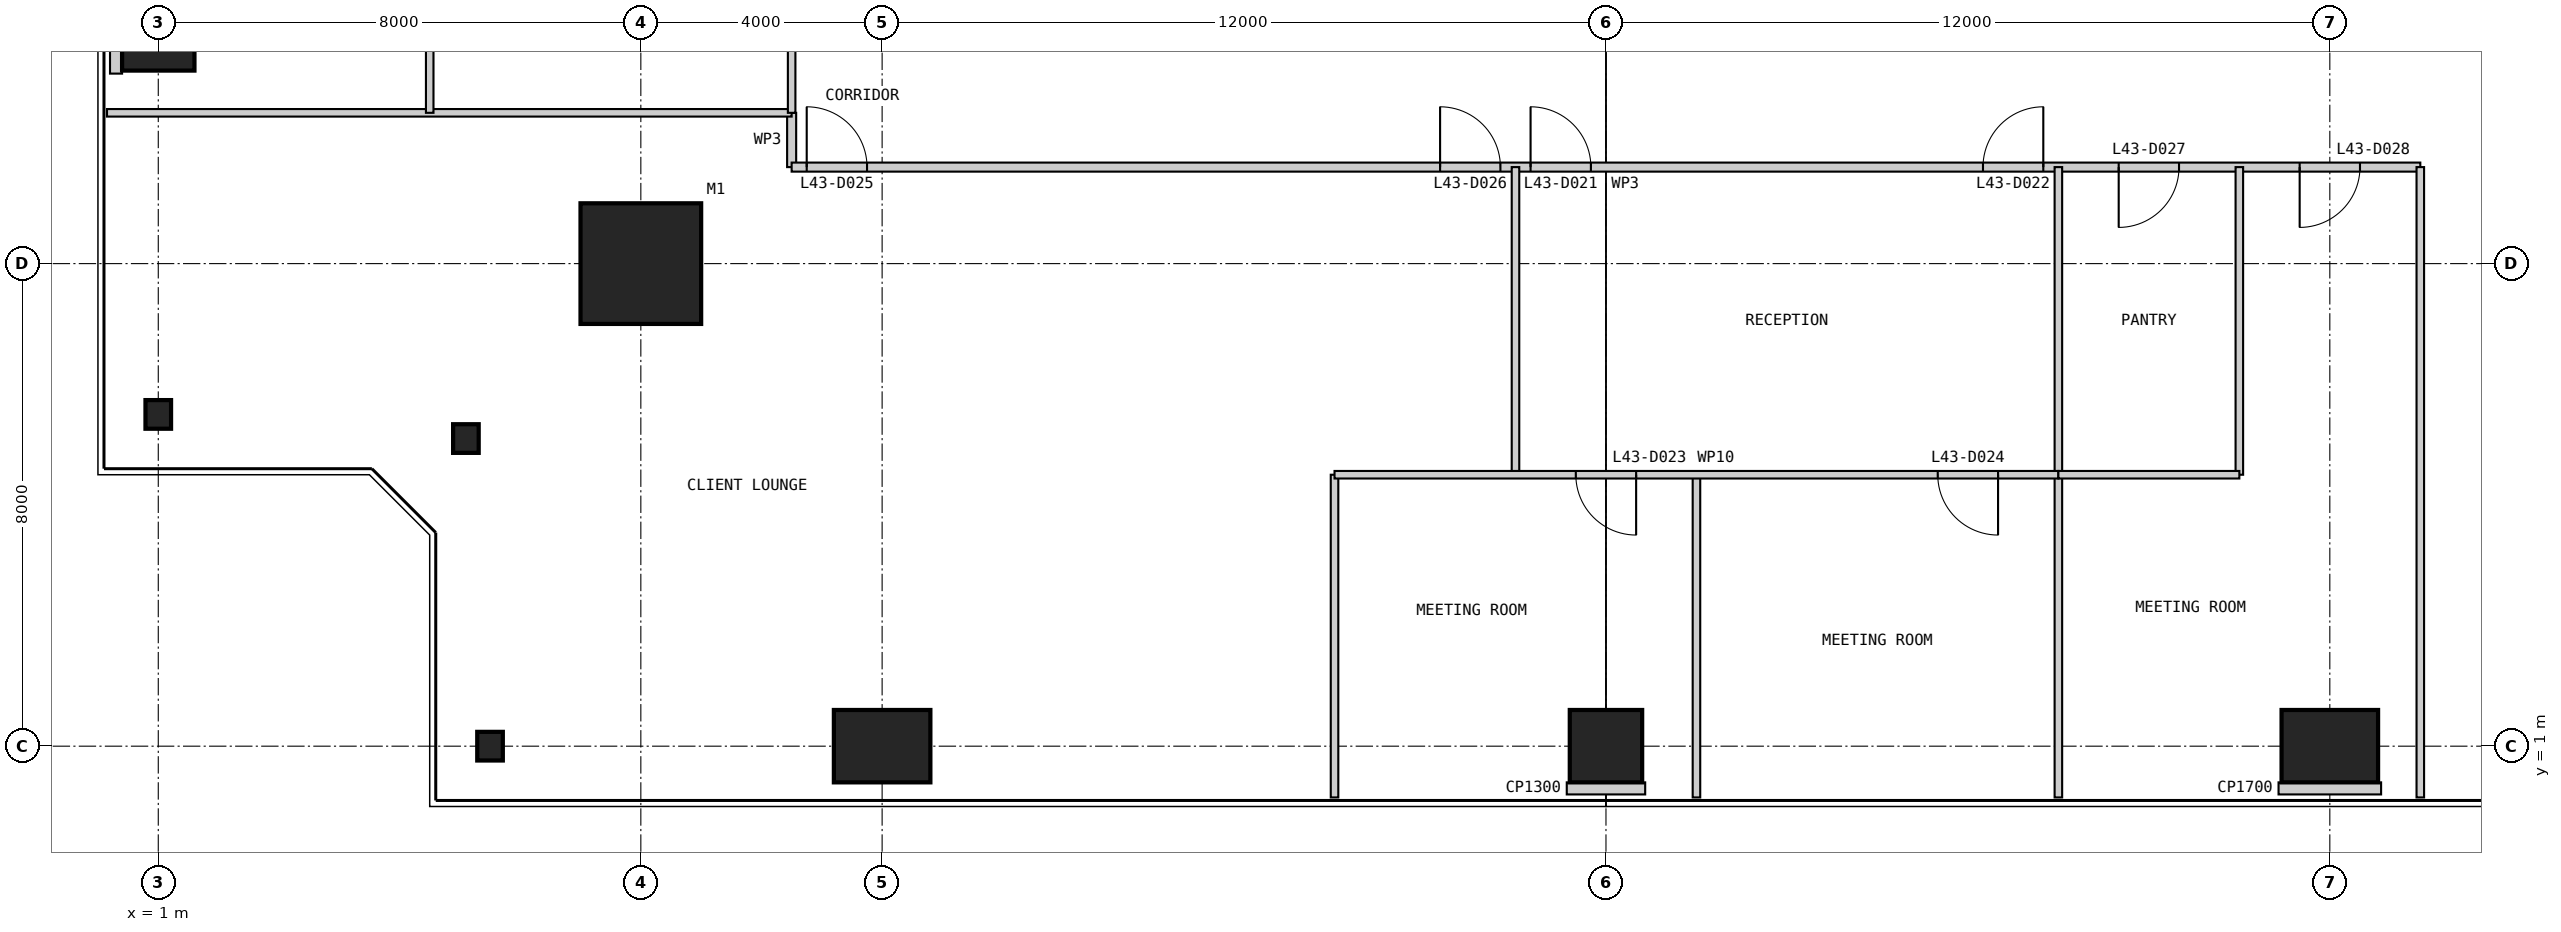
"""IFC4 building model, lengths in metres.
Left out: names, types, materials, properties, quantities, classifications, styles, units other than length and angle.
Written with IfcOpenShell. Run it as: python <this file> out.ifc"""

import sys

from ifc_helpers import new_model, si_unit, direction, frame, frame_2d, origin, origin_2d, place, context, subcontext, project, spatial, rectangle, i_section, extrude, element, fill, save


model = new_model("IFC4")
c1 = context("Model", 3, precision=1e-05, world=origin(), true_north=direction((0.0, 1.0)))
c2 = subcontext(c1, "Body", "Model", "MODEL_VIEW")
j1 = project(units=[si_unit("LENGTHUNIT", "METRE"), si_unit("PLANEANGLEUNIT", "RADIAN")], contexts=[c1])
p1 = place(None, origin())
s1 = spatial("IfcSite", under=j1, at=p1, CompositionType="ELEMENT")
p2 = place(p1, origin())
s2 = spatial("IfcBuilding", under=s1, at=p2, CompositionType="ELEMENT")
p3 = place(p2, frame((0.0, 0.0, 185.8)))
s3 = spatial("IfcBuildingStorey", under=s2, at=p3, CompositionType="ELEMENT", Elevation=185.8)
p4 = place(p3, frame((9.0, 9.0, 0.0), z_axis=(0.0, 0.0, 1.0), x_axis=(1.0, 0.0, 0.0)))
e1 = element("IfcColumn", 1, at=p4, inside=s3, PredefinedType="COLUMN", context=c2, shape_type="SweptSolid", body=[
    extrude(rectangle(XDim=2.0, YDim=2.0, at=origin_2d()), origin(), (0.0, 0.0, 1.0), 4.0),
])
p5 = place(p3, frame((6.5, 1.0, 0.0), z_axis=(0.0, 0.0, 1.0), x_axis=(1.0, 0.0, 0.0)))
e2 = element("IfcColumn", 2, at=p5, inside=s3, PredefinedType="COLUMN", context=c2, shape_type="SweptSolid", body=[
    extrude(i_section(OverallWidth=0.424, OverallDepth=0.475, WebThickness=0.048, FlangeThickness=0.077, at=origin_2d()), origin(), (0.0, 0.0, 1.0), 4.0),
])
p6 = place(p3, frame((13.0, 1.0, 0.0), z_axis=(0.0, 0.0, 1.0), x_axis=(1.0, 0.0, 0.0)))
e3 = element("IfcColumn", 3, at=p6, inside=s3, PredefinedType="COLUMN", context=c2, shape_type="SweptSolid", body=[
    extrude(rectangle(XDim=1.6, YDim=1.2, at=origin_2d()), origin(), (0.0, 0.0, 1.0), 4.0),
])
p7 = place(p3, frame((25.0, 1.0, 0.0), z_axis=(0.0, 0.0, 1.0), x_axis=(1.0, 0.0, 0.0)))
e4 = element("IfcColumn", 4, at=p7, inside=s3, PredefinedType="COLUMN", context=c2, shape_type="SweptSolid", body=[
    extrude(rectangle(XDim=1.2, YDim=1.2, at=origin_2d()), origin(), (0.0, 0.0, 1.0), 4.0),
])
p8 = place(p3, frame((37.0, 1.0, 0.0), z_axis=(0.0, 0.0, 1.0), x_axis=(1.0, 0.0, 0.0)))
e5 = element("IfcColumn", 5, at=p8, inside=s3, PredefinedType="COLUMN", context=c2, shape_type="SweptSolid", body=[
    extrude(rectangle(XDim=1.6, YDim=1.2, at=origin_2d()), origin(), (0.0, 0.0, 1.0), 4.0),
])
p9 = place(p3, frame((1.0, 13.0, 0.0), z_axis=(0.0, 0.0, 1.0), x_axis=(1.0, 0.0, 0.0)))
e6 = element("IfcColumn", 6, at=p9, inside=s3, PredefinedType="COLUMN", context=c2, shape_type="SweptSolid", body=[
    extrude(rectangle(XDim=1.2, YDim=1.6, at=origin_2d()), origin(), (0.0, 0.0, 1.0), 4.0),
])
for number, where, z_axis, x_axis in (
    (7, (1.0, 6.5, 0.0), (0.0, 0.0, 1.0), (1.0, 0.0, 0.0)),
    (8, (6.1, 6.1, 0.0), (0.0, 0.0, 1.0), (1.0, 0.0, 0.0)),
):
    element("IfcColumn", number, at=place(p3, frame(where, z_axis=z_axis, x_axis=x_axis)), inside=s3, PredefinedType="COLUMN", context=c2, shape_type="SweptSolid", body=[
        extrude(i_section(OverallWidth=0.424, OverallDepth=0.475, WebThickness=0.048, FlangeThickness=0.077, at=origin_2d()), origin(), (0.0, 0.0, 1.0), 4.0),
    ])
p10 = place(p3, frame((11.5, 11.5, 0.0), z_axis=(0.0, 0.0, 1.0), x_axis=(0.0, -1.0, 0.0)))
e9 = element("IfcWall", 9, at=p10, inside=s3, PredefinedType="PARTITIONING", context=c2, shape_type="SweptSolid", body=[
    extrude(rectangle(XDim=0.9, YDim=0.15, at=frame_2d((0.45, 0.0))), origin(), (0.0, 0.0, 1.0), 3.85),
])
p11 = place(p3, frame((11.5, 10.6, 0.0), z_axis=(0.0, 0.0, 1.0), x_axis=(1.0, 0.0, 0.0)))
e10 = element("IfcWall", 10, at=p11, inside=s3, PredefinedType="PARTITIONING", context=c2, shape_type="SweptSolid", body=[
    extrude(rectangle(XDim=27.0, YDim=0.15, at=frame_2d((13.5, 0.0))), origin(), (0.0, 0.0, 1.0), 3.85),
])
p12 = place(p11, frame((12.25, 0.0, 0.0)))
e11 = element("IfcOpeningElement", 11, at=p12, cuts=e10, PredefinedType="OPENING", context=c2, shape_type="SweptSolid", body=[
    extrude(rectangle(XDim=1.0, YDim=2.2, at=frame_2d((0.5, 1.1))), frame((0.0, 0.085, 0.0), z_axis=(0.0, -1.0, 0.0), x_axis=(1.0, 0.0, 0.0)), (0.0, 0.0, 1.0), 0.17),
])
p13 = place(p11, frame((19.75, 0.0, 0.0)))
e12 = element("IfcOpeningElement", 12, at=p13, cuts=e10, PredefinedType="OPENING", context=c2, shape_type="SweptSolid", body=[
    extrude(rectangle(XDim=1.0, YDim=2.2, at=frame_2d((0.5, 1.1))), frame((0.0, 0.085, 0.0), z_axis=(0.0, -1.0, 0.0), x_axis=(1.0, 0.0, 0.0)), (0.0, 0.0, 1.0), 0.17),
])
p14 = place(p11, frame((0.25, 0.0, 0.0)))
e13 = element("IfcOpeningElement", 13, at=p14, cuts=e10, PredefinedType="OPENING", context=c2, shape_type="SweptSolid", body=[
    extrude(rectangle(XDim=1.0, YDim=2.2, at=frame_2d((0.5, 1.1))), frame((0.0, 0.085, 0.0), z_axis=(0.0, -1.0, 0.0), x_axis=(1.0, 0.0, 0.0)), (0.0, 0.0, 1.0), 0.17),
])
p15 = place(p11, frame((10.75, 0.0, 0.0)))
e14 = element("IfcOpeningElement", 14, at=p15, cuts=e10, PredefinedType="OPENING", context=c2, shape_type="SweptSolid", body=[
    extrude(rectangle(XDim=1.0, YDim=2.2, at=frame_2d((0.5, 1.1))), frame((0.0, 0.085, 0.0), z_axis=(0.0, -1.0, 0.0), x_axis=(1.0, 0.0, 0.0)), (0.0, 0.0, 1.0), 0.17),
])
p16 = place(p11, frame((22.0, 0.0, 0.0)))
e15 = element("IfcOpeningElement", 15, at=p16, cuts=e10, PredefinedType="OPENING", context=c2, shape_type="SweptSolid", body=[
    extrude(rectangle(XDim=1.0, YDim=2.2, at=frame_2d((0.5, 1.1))), frame((0.0, 0.085, 0.0), z_axis=(0.0, -1.0, 0.0), x_axis=(1.0, 0.0, 0.0)), (0.0, 0.0, 1.0), 0.17),
])
p17 = place(p11, frame((25.0, 0.0, 0.0)))
e16 = element("IfcOpeningElement", 16, at=p17, cuts=e10, PredefinedType="OPENING", context=c2, shape_type="SweptSolid", body=[
    extrude(rectangle(XDim=1.0, YDim=2.2, at=frame_2d((0.5, 1.1))), frame((0.0, 0.085, 0.0), z_axis=(0.0, -1.0, 0.0), x_axis=(1.0, 0.0, 0.0)), (0.0, 0.0, 1.0), 0.17),
])
p18 = place(p3, frame((0.15, 11.5, 0.0), z_axis=(0.0, 0.0, 1.0), x_axis=(1.0, 0.0, 0.0)))
e17 = element("IfcWall", 17, at=p18, inside=s3, PredefinedType="PARTITIONING", context=c2, shape_type="SweptSolid", body=[
    extrude(rectangle(XDim=11.35, YDim=0.125, at=frame_2d((5.675, 0.0))), origin(), (0.0, 0.0, 1.0), 3.85),
])
p19 = place(p3, frame((20.5, 0.15, 0.0), z_axis=(0.0, 0.0, 1.0), x_axis=(0.0, 1.0, 0.0)))
e18 = element("IfcWall", 18, at=p19, inside=s3, PredefinedType="PARTITIONING", context=c2, shape_type="SweptSolid", body=[
    extrude(rectangle(XDim=5.35, YDim=0.125, at=frame_2d((2.675, 0.0))), origin(), (0.0, 0.0, 1.0), 3.85),
])
p20 = place(p3, frame((23.5, 5.5, 0.0), z_axis=(0.0, 0.0, 1.0), x_axis=(0.0, 1.0, 0.0)))
e19 = element("IfcWall", 19, at=p20, inside=s3, PredefinedType="PARTITIONING", context=c2, shape_type="SweptSolid", body=[
    extrude(rectangle(XDim=5.1, YDim=0.125, at=frame_2d((2.55, 0.0))), origin(), (0.0, 0.0, 1.0), 3.85),
])
p21 = place(p3, frame((26.5, 0.15, 0.0), z_axis=(0.0, 0.0, 1.0), x_axis=(0.0, 1.0, 0.0)))
e20 = element("IfcWall", 20, at=p21, inside=s3, PredefinedType="PARTITIONING", context=c2, shape_type="SweptSolid", body=[
    extrude(rectangle(XDim=5.35, YDim=0.125, at=frame_2d((2.675, 0.0))), origin(), (0.0, 0.0, 1.0), 3.85),
])
p22 = place(p3, frame((32.5, 0.15, 0.0), z_axis=(0.0, 0.0, 1.0), x_axis=(0.0, 1.0, 0.0)))
e21 = element("IfcWall", 21, at=p22, inside=s3, PredefinedType="PARTITIONING", context=c2, shape_type="SweptSolid", body=[
    extrude(rectangle(XDim=10.45, YDim=0.125, at=frame_2d((5.225, 0.0))), origin(), (0.0, 0.0, 1.0), 3.85),
])
p23 = place(p3, frame((35.5, 5.5, 0.0), z_axis=(0.0, 0.0, 1.0), x_axis=(0.0, 1.0, 0.0)))
e22 = element("IfcWall", 22, at=p23, inside=s3, PredefinedType="PARTITIONING", context=c2, shape_type="SweptSolid", body=[
    extrude(rectangle(XDim=5.1, YDim=0.125, at=frame_2d((2.55, 0.0))), origin(), (0.0, 0.0, 1.0), 3.85),
])
p24 = place(p3, frame((20.5, 5.5, 0.0), z_axis=(0.0, 0.0, 1.0), x_axis=(1.0, 0.0, 0.0)))
e23 = element("IfcWall", 23, at=p24, inside=s3, PredefinedType="PARTITIONING", context=c2, shape_type="SweptSolid", body=[
    extrude(rectangle(XDim=12.0, YDim=0.125, at=frame_2d((6.0, 0.0))), origin(), (0.0, 0.0, 1.0), 3.85),
])
p25 = place(p24, frame((4.0, 0.0, 0.0)))
e24 = element("IfcOpeningElement", 24, at=p25, cuts=e23, PredefinedType="OPENING", context=c2, shape_type="SweptSolid", body=[
    extrude(rectangle(XDim=1.0, YDim=2.2, at=frame_2d((0.5, 1.1))), frame((0.0, 0.073, 0.0), z_axis=(0.0, -1.0, 0.0), x_axis=(1.0, 0.0, 0.0)), (0.0, 0.0, 1.0), 0.145),
])
p26 = place(p24, frame((10.0, 0.0, 0.0)))
e25 = element("IfcOpeningElement", 25, at=p26, cuts=e23, PredefinedType="OPENING", context=c2, shape_type="SweptSolid", body=[
    extrude(rectangle(XDim=1.0, YDim=2.2, at=frame_2d((0.5, 1.1))), frame((0.0, 0.073, 0.0), z_axis=(0.0, -1.0, 0.0), x_axis=(1.0, 0.0, 0.0)), (0.0, 0.0, 1.0), 0.145),
])
p27 = place(p3, frame((32.5, 5.5, 0.0), z_axis=(0.0, 0.0, 1.0), x_axis=(1.0, 0.0, 0.0)))
e26 = element("IfcWall", 26, at=p27, inside=s3, PredefinedType="PARTITIONING", context=c2, shape_type="SweptSolid", body=[
    extrude(rectangle(XDim=3.0, YDim=0.125, at=frame_2d((1.5, 0.0))), origin(), (0.0, 0.0, 1.0), 3.85),
])
p28 = place(p3, frame((38.5, 0.15, 0.0), z_axis=(0.0, 0.0, 1.0), x_axis=(0.0, 1.0, 0.0)))
e27 = element("IfcWall", 27, at=p28, inside=s3, PredefinedType="PARTITIONING", context=c2, shape_type="SweptSolid", body=[
    extrude(rectangle(XDim=10.45, YDim=0.125, at=frame_2d((5.225, 0.0))), origin(), (0.0, 0.0, 1.0), 3.85),
])
p29 = place(p3, frame((5.5, 35.5, 0.0), z_axis=(0.0, 0.0, 1.0), x_axis=(0.0, -1.0, 0.0)))
e28 = element("IfcWall", 28, at=p29, inside=s3, PredefinedType="PARTITIONING", context=c2, shape_type="SweptSolid", body=[
    extrude(rectangle(XDim=24.0, YDim=0.125, at=frame_2d((12.0, 0.0))), origin(), (0.0, 0.0, 1.0), 3.85),
])
p30 = place(p29, frame((4.05, 0.0, 0.0)))
e29 = element("IfcOpeningElement", 29, at=p30, cuts=e28, PredefinedType="OPENING", context=c2, shape_type="SweptSolid", body=[
    extrude(rectangle(XDim=0.9, YDim=2.2, at=frame_2d((0.45, 1.1))), frame((0.0, 0.073, 0.0), z_axis=(0.0, -1.0, 0.0), x_axis=(1.0, 0.0, 0.0)), (0.0, 0.0, 1.0), 0.145),
])
p31 = place(p29, frame((10.05, 0.0, 0.0)))
e30 = element("IfcOpeningElement", 30, at=p31, cuts=e28, PredefinedType="OPENING", context=c2, shape_type="SweptSolid", body=[
    extrude(rectangle(XDim=0.9, YDim=2.2, at=frame_2d((0.45, 1.1))), frame((0.0, 0.073, 0.0), z_axis=(0.0, -1.0, 0.0), x_axis=(1.0, 0.0, 0.0)), (0.0, 0.0, 1.0), 0.145),
])
p32 = place(p29, frame((16.05, 0.0, 0.0)))
e31 = element("IfcOpeningElement", 31, at=p32, cuts=e28, PredefinedType="OPENING", context=c2, shape_type="SweptSolid", body=[
    extrude(rectangle(XDim=0.9, YDim=2.2, at=frame_2d((0.45, 1.1))), frame((0.0, 0.073, 0.0), z_axis=(0.0, -1.0, 0.0), x_axis=(1.0, 0.0, 0.0)), (0.0, 0.0, 1.0), 0.145),
])
p33 = place(p29, frame((19.05, 0.0, 0.0)))
e32 = element("IfcOpeningElement", 32, at=p33, cuts=e28, PredefinedType="OPENING", context=c2, shape_type="SweptSolid", body=[
    extrude(rectangle(XDim=0.9, YDim=2.2, at=frame_2d((0.45, 1.1))), frame((0.0, 0.073, 0.0), z_axis=(0.0, -1.0, 0.0), x_axis=(1.0, 0.0, 0.0)), (0.0, 0.0, 1.0), 0.145),
])
p34 = place(p3, frame((11.5, 14.5, 0.0), z_axis=(0.0, 0.0, 1.0), x_axis=(0.0, -1.0, 0.0)))
e33 = element("IfcWall", 33, at=p34, inside=s3, PredefinedType="PARTITIONING", context=c2, shape_type="SweptSolid", body=[
    extrude(rectangle(XDim=3.0, YDim=0.125, at=frame_2d((1.5, 0.0))), origin(), (0.0, 0.0, 1.0), 3.85),
])
p35 = place(p3, frame((25.0, 0.2, 0.0), z_axis=(0.0, 0.0, 1.0), x_axis=(0.0, 1.0, 0.0)))
e34 = element("IfcWall", 34, at=p35, inside=s3, PredefinedType="PARTITIONING", context=c2, shape_type="SweptSolid", body=[
    extrude(rectangle(XDim=0.2, YDim=1.3, at=frame_2d((0.1, 0.0))), origin(), (0.0, 0.0, 1.0), 3.85),
])
for number, where, z_axis, x_axis in (
    (35, (37.0, 0.2, 0.0), (0.0, 0.0, 1.0), (0.0, 1.0, 0.0)),
    (36, (0.2, 13.0, 0.0), (0.0, 0.0, 1.0), (1.0, 0.0, 0.0)),
):
    element("IfcWall", number, at=place(p3, frame(where, z_axis=z_axis, x_axis=x_axis)), inside=s3, PredefinedType="PARTITIONING", context=c2, shape_type="SweptSolid", body=[
        extrude(rectangle(XDim=0.2, YDim=1.7, at=frame_2d((0.1, 0.0))), origin(), (0.0, 0.0, 1.0), 3.85),
    ])
p36 = place(p12, origin())
e37 = element("IfcDoor", 37, at=p36, inside=s3, OperationType="SINGLE_SWING_LEFT", PredefinedType="DOOR", context=c2, shape_type="SweptSolid", body=[
    extrude(rectangle(XDim=1.0, YDim=2.2, at=frame_2d((0.5, 1.1))), frame((0.0, 0.025, 0.0), z_axis=(0.0, -1.0, 0.0), x_axis=(1.0, 0.0, 0.0)), (0.0, 0.0, 1.0), 0.05),
])
fill(e11, e37)
p37 = place(p13, origin())
e38 = element("IfcDoor", 38, at=p37, inside=s3, OperationType="SINGLE_SWING_RIGHT", PredefinedType="DOOR", context=c2, shape_type="SweptSolid", body=[
    extrude(rectangle(XDim=1.0, YDim=2.2, at=frame_2d((0.5, 1.1))), frame((0.0, 0.025, 0.0), z_axis=(0.0, -1.0, 0.0), x_axis=(1.0, 0.0, 0.0)), (0.0, 0.0, 1.0), 0.05),
])
fill(e12, e38)
p38 = place(p25, frame((1.0, 0.0, 0.0), z_axis=(0.0, 0.0, 1.0), x_axis=(-1.0, 0.0, 0.0)))
e39 = element("IfcDoor", 39, at=p38, inside=s3, OperationType="SINGLE_SWING_LEFT", PredefinedType="DOOR", context=c2, shape_type="SweptSolid", body=[
    extrude(rectangle(XDim=1.0, YDim=2.2, at=frame_2d((0.5, 1.1))), frame((0.0, 0.025, 0.0), z_axis=(0.0, -1.0, 0.0), x_axis=(1.0, 0.0, 0.0)), (0.0, 0.0, 1.0), 0.05),
])
fill(e24, e39)
p39 = place(p26, frame((1.0, 0.0, 0.0), z_axis=(0.0, 0.0, 1.0), x_axis=(-1.0, 0.0, 0.0)))
e40 = element("IfcDoor", 40, at=p39, inside=s3, OperationType="SINGLE_SWING_LEFT", PredefinedType="DOOR", context=c2, shape_type="SweptSolid", body=[
    extrude(rectangle(XDim=1.0, YDim=2.2, at=frame_2d((0.5, 1.1))), frame((0.0, 0.025, 0.0), z_axis=(0.0, -1.0, 0.0), x_axis=(1.0, 0.0, 0.0)), (0.0, 0.0, 1.0), 0.05),
])
fill(e25, e40)
p40 = place(p14, origin())
e41 = element("IfcDoor", 41, at=p40, inside=s3, OperationType="SINGLE_SWING_LEFT", PredefinedType="DOOR", context=c2, shape_type="SweptSolid", body=[
    extrude(rectangle(XDim=1.0, YDim=2.2, at=frame_2d((0.5, 1.1))), frame((0.0, 0.025, 0.0), z_axis=(0.0, -1.0, 0.0), x_axis=(1.0, 0.0, 0.0)), (0.0, 0.0, 1.0), 0.05),
])
fill(e13, e41)
p41 = place(p15, origin())
e42 = element("IfcDoor", 42, at=p41, inside=s3, OperationType="SINGLE_SWING_LEFT", PredefinedType="DOOR", context=c2, shape_type="SweptSolid", body=[
    extrude(rectangle(XDim=1.0, YDim=2.2, at=frame_2d((0.5, 1.1))), frame((0.0, 0.025, 0.0), z_axis=(0.0, -1.0, 0.0), x_axis=(1.0, 0.0, 0.0)), (0.0, 0.0, 1.0), 0.05),
])
fill(e14, e42)
p42 = place(p16, frame((1.0, 0.0, 0.0), z_axis=(0.0, 0.0, 1.0), x_axis=(-1.0, 0.0, 0.0)))
e43 = element("IfcDoor", 43, at=p42, inside=s3, OperationType="SINGLE_SWING_RIGHT", PredefinedType="DOOR", context=c2, shape_type="SweptSolid", body=[
    extrude(rectangle(XDim=1.0, YDim=2.2, at=frame_2d((0.5, 1.1))), frame((0.0, 0.025, 0.0), z_axis=(0.0, -1.0, 0.0), x_axis=(1.0, 0.0, 0.0)), (0.0, 0.0, 1.0), 0.05),
])
fill(e15, e43)
p43 = place(p17, frame((1.0, 0.0, 0.0), z_axis=(0.0, 0.0, 1.0), x_axis=(-1.0, 0.0, 0.0)))
e44 = element("IfcDoor", 44, at=p43, inside=s3, OperationType="SINGLE_SWING_RIGHT", PredefinedType="DOOR", context=c2, shape_type="SweptSolid", body=[
    extrude(rectangle(XDim=1.0, YDim=2.2, at=frame_2d((0.5, 1.1))), frame((0.0, 0.025, 0.0), z_axis=(0.0, -1.0, 0.0), x_axis=(1.0, 0.0, 0.0)), (0.0, 0.0, 1.0), 0.05),
])
fill(e16, e44)
save(model, sys.argv[1])
